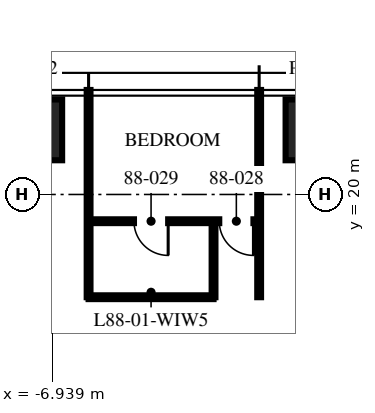
"""IFC4 building model, lengths in metres.
Left out: names, types, materials, properties, quantities, classifications, styles, units other than length and angle.
Written with IfcOpenShell. Run it as: python <this file> out.ifc"""

import sys

from ifc_helpers import new_model, si_unit, direction, frame, frame_2d, origin, origin_2d, place, context, subcontext, project, spatial, rectangle, extrude, element, fill, save


model = new_model("IFC4")
c1 = context("Model", 3, precision=1e-05, world=origin(), true_north=direction((0.0, 1.0)))
c2 = subcontext(c1, "Body", "Model", "MODEL_VIEW")
j1 = project(units=[si_unit("LENGTHUNIT", "METRE"), si_unit("PLANEANGLEUNIT", "RADIAN")], contexts=[c1])
p1 = place(None, origin())
s1 = spatial("IfcSite", under=j1, at=p1, CompositionType="ELEMENT")
p2 = place(p1, origin())
s2 = spatial("IfcBuilding", under=s1, at=p2, CompositionType="ELEMENT")
p3 = place(p2, frame((0.0, 0.0, 349.5)))
s3 = spatial("IfcBuildingStorey", under=s2, at=p3, CompositionType="ELEMENT", Elevation=349.5)
for number, where, z_axis, x_axis in (
    (1, (-7.48, 21.7, 0.0), (0.0, 0.0, 1.0), (1.0, 0.0, 0.0)),
    (2, (0.0, 21.7, 0.0), (0.0, 0.0, 1.0), (1.0, 0.0, 0.0)),
):
    element("IfcColumn", number, at=place(p3, frame(where, z_axis=z_axis, x_axis=x_axis)), inside=s3, PredefinedType="COLUMN", context=c2, shape_type="SweptSolid", body=[
        extrude(rectangle(XDim=1.6, YDim=1.6, at=origin_2d()), origin(), (0.0, 0.0, 1.0), 3.75),
    ])
for number, where, z_axis, x_axis in (
    (3, (-1.496, 17.296, 0.0), (0.0, 0.0, 1.0), (0.0, 1.0, 0.0)),
    (4, (-5.984, 17.296, 0.0), (0.0, 0.0, 1.0), (0.0, 1.0, 0.0)),
):
    element("IfcWall", number, at=place(p3, frame(where, z_axis=z_axis, x_axis=x_axis)), inside=s3, PredefinedType="PARTITIONING", context=c2, shape_type="SweptSolid", body=[
        extrude(rectangle(XDim=5.454, YDim=0.1, at=frame_2d((2.727, 0.0))), origin(), (0.0, 0.0, 1.0), 2.85),
    ])
p4 = place(p3, frame((-1.496, 19.296, 0.0), z_axis=(0.0, 0.0, 1.0), x_axis=(-1.0, 0.0, 0.0)))
e5 = element("IfcWall", 5, at=p4, inside=s3, PredefinedType="PARTITIONING", context=c2, shape_type="SweptSolid", body=[
    extrude(rectangle(XDim=4.488, YDim=0.1, at=frame_2d((2.244, 0.0))), origin(), (0.0, 0.0, 1.0), 2.56),
])
p5 = place(p4, frame((0.15, 0.0, 0.0)))
e6 = element("IfcOpeningElement", 6, at=p5, cuts=e5, PredefinedType="OPENING", context=c2, shape_type="SweptSolid", body=[
    extrude(rectangle(XDim=0.9, YDim=2.1, at=frame_2d((0.45, 1.05))), frame((0.0, 0.06, 0.0), z_axis=(0.0, -1.0, 0.0), x_axis=(1.0, 0.0, 0.0)), (0.0, 0.0, 1.0), 0.12),
])
p6 = place(p4, frame((2.394, 0.0, 0.0)))
e7 = element("IfcOpeningElement", 7, at=p6, cuts=e5, PredefinedType="OPENING", context=c2, shape_type="SweptSolid", body=[
    extrude(rectangle(XDim=0.9, YDim=2.1, at=frame_2d((0.45, 1.05))), frame((0.0, 0.06, 0.0), z_axis=(0.0, -1.0, 0.0), x_axis=(1.0, 0.0, 0.0)), (0.0, 0.0, 1.0), 0.12),
])
p7 = place(p3, frame((-2.696, 17.296, 0.0), z_axis=(0.0, 0.0, 1.0), x_axis=(0.0, 1.0, 0.0)))
e8 = element("IfcWall", 8, at=p7, inside=s3, PredefinedType="PARTITIONING", context=c2, shape_type="SweptSolid", body=[
    extrude(rectangle(XDim=2.0, YDim=0.1, at=frame_2d((1.0, 0.0))), origin(), (0.0, 0.0, 1.0), 3.45),
])
p8 = place(p3, frame((-2.696, 17.296, 0.0), z_axis=(0.0, 0.0, 1.0), x_axis=(-1.0, 0.0, 0.0)))
e9 = element("IfcWall", 9, at=p8, inside=s3, PredefinedType="PARTITIONING", context=c2, shape_type="SweptSolid", body=[
    extrude(rectangle(XDim=3.288, YDim=0.1, at=frame_2d((1.644, 0.0))), origin(), (0.0, 0.0, 1.0), 2.56),
])
p9 = place(p5, origin())
e10 = element("IfcDoor", 10, at=p9, inside=s3, OperationType="SINGLE_SWING_LEFT", PredefinedType="DOOR", context=c2, shape_type="SweptSolid", body=[
    extrude(rectangle(XDim=0.9, YDim=2.1, at=frame_2d((0.45, 1.05))), frame((0.0, 0.025, 0.0), z_axis=(0.0, -1.0, 0.0), x_axis=(1.0, 0.0, 0.0)), (0.0, 0.0, 1.0), 0.05),
])
fill(e6, e10)
p10 = place(p6, origin())
e11 = element("IfcDoor", 11, at=p10, inside=s3, OperationType="SINGLE_SWING_LEFT", PredefinedType="DOOR", context=c2, shape_type="SweptSolid", body=[
    extrude(rectangle(XDim=0.9, YDim=2.1, at=frame_2d((0.45, 1.05))), frame((0.0, 0.025, 0.0), z_axis=(0.0, -1.0, 0.0), x_axis=(1.0, 0.0, 0.0)), (0.0, 0.0, 1.0), 0.05),
])
fill(e7, e11)
save(model, sys.argv[1])
